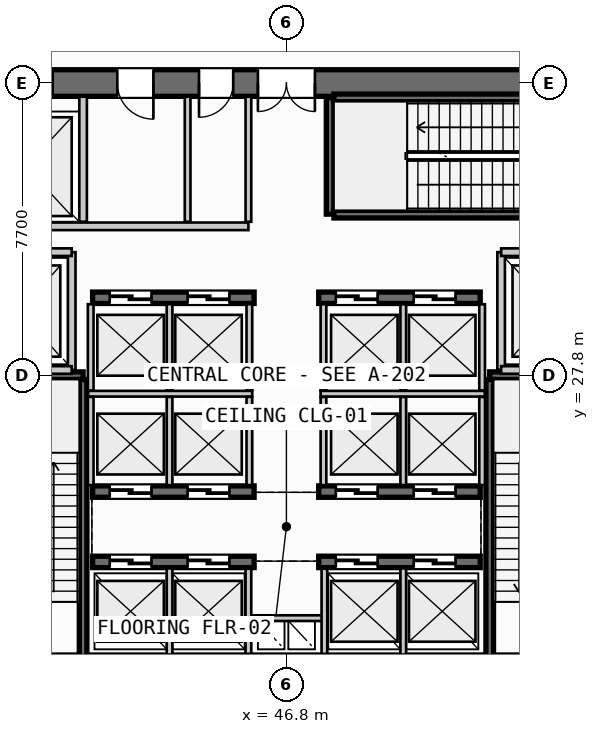
"""IFC4 building model, lengths in metres.
Left out: names, types, materials, properties, quantities, classifications, styles, units other than length and angle.
Written with IfcOpenShell. Run it as: python <this file> out.ifc"""

import sys

from ifc_helpers import new_model, si_unit, direction, frame, frame_2d, origin, place, context, subcontext, project, spatial, rectangle, extrude, source, transform, mapped, element, fill, save


model = new_model("IFC4")
c1 = context("Model", 3, precision=1e-05, world=origin(), true_north=direction((0.0, 1.0)))
c2 = subcontext(c1, "Body", "Model", "MODEL_VIEW")
j1 = project(units=[si_unit("LENGTHUNIT", "METRE"), si_unit("PLANEANGLEUNIT", "RADIAN")], contexts=[c1])
p1 = place(None, origin())
s1 = spatial("IfcSite", under=j1, at=p1, CompositionType="ELEMENT")
p2 = place(p1, origin())
s2 = spatial("IfcBuilding", under=s1, at=p2, CompositionType="ELEMENT")
p3 = place(p2, origin())
s3 = spatial("IfcBuildingStorey", under=s2, at=p3, CompositionType="ELEMENT", Elevation=0.0)
p4 = place(p3, frame((38.0, 20.1, 0.0), z_axis=(0.0, 0.0, 1.0), x_axis=(1.0, 0.0, 0.0)))
e1 = element("IfcWall", 1, at=p4, inside=s3, PredefinedType="SHEAR", context=c2, shape_type="SweptSolid", body=[
    extrude(rectangle(XDim=17.6, YDim=0.7, at=frame_2d((8.8, 0.0))), origin(), (0.0, 0.0, 1.0), 4.95),
])
p5 = place(p4, frame((1.4, 0.0, 0.0)))
e2 = element("IfcOpeningElement", 2, at=p5, cuts=e1, PredefinedType="OPENING", context=c2, shape_type="SweptSolid", body=[
    extrude(rectangle(XDim=1.05, YDim=2.15, at=frame_2d((0.525, 1.075))), frame((0.0, 0.36, 0.0), z_axis=(0.0, -1.0, 0.0), x_axis=(1.0, 0.0, 0.0)), (0.0, 0.0, 1.0), 0.72),
])
p6 = place(p4, frame((15.15, 0.0, 0.0)))
e3 = element("IfcOpeningElement", 3, at=p6, cuts=e1, PredefinedType="OPENING", context=c2, shape_type="SweptSolid", body=[
    extrude(rectangle(XDim=1.05, YDim=2.15, at=frame_2d((0.525, 1.075))), frame((0.0, 0.36, 0.0), z_axis=(0.0, -1.0, 0.0), x_axis=(1.0, 0.0, 0.0)), (0.0, 0.0, 1.0), 0.72),
])
p7 = place(p3, frame((55.6, 35.5, 0.0), z_axis=(0.0, 0.0, 1.0), x_axis=(-1.0, 0.0, 0.0)))
e4 = element("IfcWall", 4, at=p7, inside=s3, PredefinedType="SHEAR", context=c2, shape_type="SweptSolid", body=[
    extrude(rectangle(XDim=17.6, YDim=0.7, at=frame_2d((8.8, 0.0))), origin(), (0.0, 0.0, 1.0), 4.95),
])
p8 = place(p7, frame((8.05, 0.0, 0.0)))
e5 = element("IfcOpeningElement", 5, at=p8, cuts=e4, PredefinedType="OPENING", context=c2, shape_type="SweptSolid", body=[
    extrude(rectangle(XDim=1.5, YDim=2.2, at=frame_2d((0.75, 1.1))), frame((0.0, 0.36, 0.0), z_axis=(0.0, -1.0, 0.0), x_axis=(1.0, 0.0, 0.0)), (0.0, 0.0, 1.0), 0.72),
])
p9 = place(p7, frame((14.95, 0.0, 0.0)))
e6 = element("IfcOpeningElement", 6, at=p9, cuts=e4, PredefinedType="OPENING", context=c2, shape_type="SweptSolid", body=[
    extrude(rectangle(XDim=1.4, YDim=2.3, at=frame_2d((0.7, 1.15))), frame((0.0, 0.36, 0.0), z_axis=(0.0, -1.0, 0.0), x_axis=(1.0, 0.0, 0.0)), (0.0, 0.0, 1.0), 0.72),
])
p10 = place(p7, frame((12.3, 0.0, 0.0)))
e7 = element("IfcOpeningElement", 7, at=p10, cuts=e4, PredefinedType="OPENING", context=c2, shape_type="SweptSolid", body=[
    extrude(rectangle(XDim=0.95, YDim=2.15, at=frame_2d((0.475, 1.075))), frame((0.0, 0.36, 0.0), z_axis=(0.0, -1.0, 0.0), x_axis=(1.0, 0.0, 0.0)), (0.0, 0.0, 1.0), 0.72),
])
p11 = place(p7, frame((10.2, 0.0, 0.0)))
e8 = element("IfcOpeningElement", 8, at=p11, cuts=e4, PredefinedType="OPENING", context=c2, shape_type="SweptSolid", body=[
    extrude(rectangle(XDim=0.9, YDim=2.15, at=frame_2d((0.45, 1.075))), frame((0.0, 0.36, 0.0), z_axis=(0.0, -1.0, 0.0), x_axis=(1.0, 0.0, 0.0)), (0.0, 0.0, 1.0), 0.72),
])
p12 = place(p3, frame((41.7, 22.9, 0.0), z_axis=(0.0, 0.0, 1.0), x_axis=(1.0, 0.0, 0.0)))
e9 = element("IfcWall", 9, at=p12, inside=s3, PredefinedType="SHEAR", context=c2, shape_type="SweptSolid", body=[
    extrude(rectangle(XDim=4.25, YDim=0.3, at=frame_2d((2.125, 0.0))), origin(), (0.0, 0.0, 1.0), 4.95),
])
p13 = place(p12, frame((0.45, 0.0, 0.0)))
e10 = element("IfcOpeningElement", 10, at=p13, cuts=e9, PredefinedType="OPENING", context=c2, shape_type="SweptSolid", body=[
    extrude(rectangle(XDim=1.1, YDim=2.2, at=frame_2d((0.55, 1.1))), frame((0.0, 0.16, 0.0), z_axis=(0.0, -1.0, 0.0), x_axis=(1.0, 0.0, 0.0)), (0.0, 0.0, 1.0), 0.32),
])
p14 = place(p12, frame((2.5, 0.0, 0.0)))
e11 = element("IfcOpeningElement", 11, at=p14, cuts=e9, PredefinedType="OPENING", context=c2, shape_type="SweptSolid", body=[
    extrude(rectangle(XDim=1.1, YDim=2.2, at=frame_2d((0.55, 1.1))), frame((0.0, 0.16, 0.0), z_axis=(0.0, -1.0, 0.0), x_axis=(1.0, 0.0, 0.0)), (0.0, 0.0, 1.0), 0.32),
])
p15 = place(p3, frame((47.65, 22.9, 0.0), z_axis=(0.0, 0.0, 1.0), x_axis=(1.0, 0.0, 0.0)))
e12 = element("IfcWall", 12, at=p15, inside=s3, PredefinedType="SHEAR", context=c2, shape_type="SweptSolid", body=[
    extrude(rectangle(XDim=4.25, YDim=0.3, at=frame_2d((2.125, 0.0))), origin(), (0.0, 0.0, 1.0), 4.95),
])
p16 = place(p15, frame((0.45, 0.0, 0.0)))
e13 = element("IfcOpeningElement", 13, at=p16, cuts=e12, PredefinedType="OPENING", context=c2, shape_type="SweptSolid", body=[
    extrude(rectangle(XDim=1.1, YDim=2.2, at=frame_2d((0.55, 1.1))), frame((0.0, 0.16, 0.0), z_axis=(0.0, -1.0, 0.0), x_axis=(1.0, 0.0, 0.0)), (0.0, 0.0, 1.0), 0.32),
])
p17 = place(p15, frame((2.5, 0.0, 0.0)))
e14 = element("IfcOpeningElement", 14, at=p17, cuts=e12, PredefinedType="OPENING", context=c2, shape_type="SweptSolid", body=[
    extrude(rectangle(XDim=1.1, YDim=2.2, at=frame_2d((0.55, 1.1))), frame((0.0, 0.16, 0.0), z_axis=(0.0, -1.0, 0.0), x_axis=(1.0, 0.0, 0.0)), (0.0, 0.0, 1.0), 0.32),
])
p18 = place(p3, frame((41.7, 24.75, 0.0), z_axis=(0.0, 0.0, 1.0), x_axis=(1.0, 0.0, 0.0)))
e15 = element("IfcWall", 15, at=p18, inside=s3, PredefinedType="SHEAR", context=c2, shape_type="SweptSolid", body=[
    extrude(rectangle(XDim=4.25, YDim=0.3, at=frame_2d((2.125, 0.0))), origin(), (0.0, 0.0, 1.0), 4.95),
])
p19 = place(p18, frame((0.45, 0.0, 0.0)))
e16 = element("IfcOpeningElement", 16, at=p19, cuts=e15, PredefinedType="OPENING", context=c2, shape_type="SweptSolid", body=[
    extrude(rectangle(XDim=1.1, YDim=2.2, at=frame_2d((0.55, 1.1))), frame((0.0, 0.16, 0.0), z_axis=(0.0, -1.0, 0.0), x_axis=(1.0, 0.0, 0.0)), (0.0, 0.0, 1.0), 0.32),
])
p20 = place(p18, frame((2.5, 0.0, 0.0)))
e17 = element("IfcOpeningElement", 17, at=p20, cuts=e15, PredefinedType="OPENING", context=c2, shape_type="SweptSolid", body=[
    extrude(rectangle(XDim=1.1, YDim=2.2, at=frame_2d((0.55, 1.1))), frame((0.0, 0.16, 0.0), z_axis=(0.0, -1.0, 0.0), x_axis=(1.0, 0.0, 0.0)), (0.0, 0.0, 1.0), 0.32),
])
p21 = place(p3, frame((47.65, 24.75, 0.0), z_axis=(0.0, 0.0, 1.0), x_axis=(1.0, 0.0, 0.0)))
e18 = element("IfcWall", 18, at=p21, inside=s3, PredefinedType="SHEAR", context=c2, shape_type="SweptSolid", body=[
    extrude(rectangle(XDim=4.25, YDim=0.3, at=frame_2d((2.125, 0.0))), origin(), (0.0, 0.0, 1.0), 4.95),
])
p22 = place(p21, frame((0.45, 0.0, 0.0)))
e19 = element("IfcOpeningElement", 19, at=p22, cuts=e18, PredefinedType="OPENING", context=c2, shape_type="SweptSolid", body=[
    extrude(rectangle(XDim=1.1, YDim=2.2, at=frame_2d((0.55, 1.1))), frame((0.0, 0.16, 0.0), z_axis=(0.0, -1.0, 0.0), x_axis=(1.0, 0.0, 0.0)), (0.0, 0.0, 1.0), 0.32),
])
p23 = place(p21, frame((2.5, 0.0, 0.0)))
e20 = element("IfcOpeningElement", 20, at=p23, cuts=e18, PredefinedType="OPENING", context=c2, shape_type="SweptSolid", body=[
    extrude(rectangle(XDim=1.1, YDim=2.2, at=frame_2d((0.55, 1.1))), frame((0.0, 0.16, 0.0), z_axis=(0.0, -1.0, 0.0), x_axis=(1.0, 0.0, 0.0)), (0.0, 0.0, 1.0), 0.32),
])
p24 = place(p3, frame((41.7, 29.85, 0.0), z_axis=(0.0, 0.0, 1.0), x_axis=(1.0, 0.0, 0.0)))
e21 = element("IfcWall", 21, at=p24, inside=s3, PredefinedType="SHEAR", context=c2, shape_type="SweptSolid", body=[
    extrude(rectangle(XDim=4.25, YDim=0.3, at=frame_2d((2.125, 0.0))), origin(), (0.0, 0.0, 1.0), 4.95),
])
p25 = place(p24, frame((0.45, 0.0, 0.0)))
e22 = element("IfcOpeningElement", 22, at=p25, cuts=e21, PredefinedType="OPENING", context=c2, shape_type="SweptSolid", body=[
    extrude(rectangle(XDim=1.1, YDim=2.2, at=frame_2d((0.55, 1.1))), frame((0.0, 0.16, 0.0), z_axis=(0.0, -1.0, 0.0), x_axis=(1.0, 0.0, 0.0)), (0.0, 0.0, 1.0), 0.32),
])
p26 = place(p24, frame((2.5, 0.0, 0.0)))
e23 = element("IfcOpeningElement", 23, at=p26, cuts=e21, PredefinedType="OPENING", context=c2, shape_type="SweptSolid", body=[
    extrude(rectangle(XDim=1.1, YDim=2.2, at=frame_2d((0.55, 1.1))), frame((0.0, 0.16, 0.0), z_axis=(0.0, -1.0, 0.0), x_axis=(1.0, 0.0, 0.0)), (0.0, 0.0, 1.0), 0.32),
])
p27 = place(p3, frame((47.65, 29.85, 0.0), z_axis=(0.0, 0.0, 1.0), x_axis=(1.0, 0.0, 0.0)))
e24 = element("IfcWall", 24, at=p27, inside=s3, PredefinedType="SHEAR", context=c2, shape_type="SweptSolid", body=[
    extrude(rectangle(XDim=4.25, YDim=0.3, at=frame_2d((2.125, 0.0))), origin(), (0.0, 0.0, 1.0), 4.95),
])
p28 = place(p27, frame((0.45, 0.0, 0.0)))
e25 = element("IfcOpeningElement", 25, at=p28, cuts=e24, PredefinedType="OPENING", context=c2, shape_type="SweptSolid", body=[
    extrude(rectangle(XDim=1.1, YDim=2.2, at=frame_2d((0.55, 1.1))), frame((0.0, 0.16, 0.0), z_axis=(0.0, -1.0, 0.0), x_axis=(1.0, 0.0, 0.0)), (0.0, 0.0, 1.0), 0.32),
])
p29 = place(p27, frame((2.5, 0.0, 0.0)))
e26 = element("IfcOpeningElement", 26, at=p29, cuts=e24, PredefinedType="OPENING", context=c2, shape_type="SweptSolid", body=[
    extrude(rectangle(XDim=1.1, YDim=2.2, at=frame_2d((0.55, 1.1))), frame((0.0, 0.16, 0.0), z_axis=(0.0, -1.0, 0.0), x_axis=(1.0, 0.0, 0.0)), (0.0, 0.0, 1.0), 0.32),
])
p30 = place(p3, frame((38.39, 27.8, 0.0), z_axis=(0.0, 0.0, 1.0), x_axis=(1.0, 0.0, 0.0)))
e27 = element("IfcWall", 27, at=p30, inside=s3, PredefinedType="SHEAR", context=c2, shape_type="SweptSolid", body=[
    extrude(rectangle(XDim=3.06, YDim=0.2, at=frame_2d((1.53, 0.0))), origin(), (0.0, 0.0, 1.0), 4.95),
])
p31 = place(p3, frame((41.45, 27.7, 0.0), z_axis=(0.0, 0.0, 1.0), x_axis=(0.0, -1.0, 0.0)))
e28 = element("IfcWall", 28, at=p31, inside=s3, PredefinedType="SHEAR", context=c2, shape_type="SweptSolid", body=[
    extrude(rectangle(XDim=7.35, YDim=0.2, at=frame_2d((3.675, 0.0))), origin(), (0.0, 0.0, 1.0), 4.95),
])
p32 = place(p3, frame((52.15, 27.8, 0.0), z_axis=(0.0, 0.0, 1.0), x_axis=(1.0, 0.0, 0.0)))
e29 = element("IfcWall", 29, at=p32, inside=s3, PredefinedType="SHEAR", context=c2, shape_type="SweptSolid", body=[
    extrude(rectangle(XDim=3.06, YDim=0.2, at=frame_2d((1.53, 0.0))), origin(), (0.0, 0.0, 1.0), 4.95),
])
p33 = place(p3, frame((52.15, 20.35, 0.0), z_axis=(0.0, 0.0, 1.0), x_axis=(0.0, 1.0, 0.0)))
e30 = element("IfcWall", 30, at=p33, inside=s3, PredefinedType="SHEAR", context=c2, shape_type="SweptSolid", body=[
    extrude(rectangle(XDim=7.35, YDim=0.2, at=frame_2d((3.675, 0.0))), origin(), (0.0, 0.0, 1.0), 4.95),
])
p34 = place(p3, frame((47.95, 32.05, 0.0), z_axis=(0.0, 0.0, 1.0), x_axis=(0.0, 1.0, 0.0)))
e31 = element("IfcWall", 31, at=p34, inside=s3, PredefinedType="SHEAR", context=c2, shape_type="SweptSolid", body=[
    extrude(rectangle(XDim=3.06, YDim=0.2, at=frame_2d((1.53, 0.0))), origin(), (0.0, 0.0, 1.0), 4.95),
])
for number, where, z_axis, x_axis in (
    (32, (48.05, 35.11, 0.0), (0.0, 0.0, 1.0), (1.0, 0.0, 0.0)),
    (33, (55.4, 32.05, 0.0), (0.0, 0.0, 1.0), (-1.0, 0.0, 0.0)),
):
    element("IfcWall", number, at=place(p3, frame(where, z_axis=z_axis, x_axis=x_axis)), inside=s3, PredefinedType="SHEAR", context=c2, shape_type="SweptSolid", body=[
        extrude(rectangle(XDim=7.35, YDim=0.2, at=frame_2d((3.675, 0.0))), origin(), (0.0, 0.0, 1.0), 4.95),
    ])
p35 = place(p3, frame((45.8, 21.42, 0.0), z_axis=(0.0, 0.0, 1.0), x_axis=(1.0, 0.0, 0.0)))
e34 = element("IfcWall", 34, at=p35, inside=s3, PredefinedType="PARTITIONING", context=c2, shape_type="SweptSolid", body=[
    extrude(rectangle(XDim=2.0, YDim=0.15, at=frame_2d((1.0, 0.0))), origin(), (0.0, 0.0, 1.0), 4.163),
])
for number, where, z_axis, x_axis in (
    (35, (45.8, 20.48, 0.0), (0.0, 0.0, 1.0), (0.0, 1.0, 0.0)),
    (36, (47.8, 20.48, 0.0), (0.0, 0.0, 1.0), (0.0, 1.0, 0.0)),
):
    element("IfcWall", number, at=place(p3, frame(where, z_axis=z_axis, x_axis=x_axis)), inside=s3, PredefinedType="PARTITIONING", context=c2, shape_type="SweptSolid", body=[
        extrude(rectangle(XDim=2.24, YDim=0.15, at=frame_2d((1.12, 0.0))), origin(), (0.0, 0.0, 1.0), 4.163),
    ])
p36 = place(p3, frame((41.15, 27.95, 0.0), z_axis=(0.0, 0.0, 1.0), x_axis=(0.0, 1.0, 0.0)))
e37 = element("IfcWall", 37, at=p36, inside=s3, PredefinedType="PARTITIONING", context=c2, shape_type="SweptSolid", body=[
    extrude(rectangle(XDim=3.1, YDim=0.2, at=frame_2d((1.55, 0.0))), origin(), (0.0, 0.0, 1.0), 4.163),
])
for number, where, z_axis, x_axis in (
    (38, (38.36, 27.95, 0.0), (0.0, 0.0, 1.0), (1.0, 0.0, 0.0)),
    (39, (38.36, 31.05, 0.0), (0.0, 0.0, 1.0), (1.0, 0.0, 0.0)),
):
    element("IfcWall", number, at=place(p3, frame(where, z_axis=z_axis, x_axis=x_axis)), inside=s3, PredefinedType="PARTITIONING", context=c2, shape_type="SweptSolid", body=[
        extrude(rectangle(XDim=2.79, YDim=0.2, at=frame_2d((1.395, 0.0))), origin(), (0.0, 0.0, 1.0), 4.163),
    ])
p37 = place(p3, frame((52.45, 27.95, 0.0), z_axis=(0.0, 0.0, 1.0), x_axis=(0.0, 1.0, 0.0)))
e40 = element("IfcWall", 40, at=p37, inside=s3, PredefinedType="PARTITIONING", context=c2, shape_type="SweptSolid", body=[
    extrude(rectangle(XDim=3.1, YDim=0.2, at=frame_2d((1.55, 0.0))), origin(), (0.0, 0.0, 1.0), 4.163),
])
for number, where, z_axis, x_axis in (
    (41, (52.45, 27.95, 0.0), (0.0, 0.0, 1.0), (1.0, 0.0, 0.0)),
    (42, (52.45, 31.05, 0.0), (0.0, 0.0, 1.0), (1.0, 0.0, 0.0)),
):
    element("IfcWall", number, at=place(p3, frame(where, z_axis=z_axis, x_axis=x_axis)), inside=s3, PredefinedType="PARTITIONING", context=c2, shape_type="SweptSolid", body=[
        extrude(rectangle(XDim=2.79, YDim=0.2, at=frame_2d((1.395, 0.0))), origin(), (0.0, 0.0, 1.0), 4.163),
    ])
for number, where, z_axis, x_axis in (
    (43, (43.725, 20.46, 0.0), (0.0, 0.0, 1.0), (0.0, 1.0, 0.0)),
    (44, (49.875, 20.46, 0.0), (0.0, 0.0, 1.0), (0.0, 1.0, 0.0)),
):
    element("IfcWall", number, at=place(p3, frame(where, z_axis=z_axis, x_axis=x_axis)), inside=s3, PredefinedType="PARTITIONING", context=c2, shape_type="SweptSolid", body=[
        extrude(rectangle(XDim=2.27, YDim=0.15, at=frame_2d((1.135, 0.0))), origin(), (0.0, 0.0, 1.0), 4.163),
    ])
p38 = place(p3, frame((41.58, 27.325, 0.0), z_axis=(0.0, 0.0, 1.0), x_axis=(1.0, 0.0, 0.0)))
e45 = element("IfcWall", 45, at=p38, inside=s3, PredefinedType="PARTITIONING", context=c2, shape_type="SweptSolid", body=[
    extrude(rectangle(XDim=4.32, YDim=0.15, at=frame_2d((2.16, 0.0))), origin(), (0.0, 0.0, 1.0), 4.163),
])
p39 = place(p3, frame((47.7, 27.325, 0.0), z_axis=(0.0, 0.0, 1.0), x_axis=(1.0, 0.0, 0.0)))
e46 = element("IfcWall", 46, at=p39, inside=s3, PredefinedType="PARTITIONING", context=c2, shape_type="SweptSolid", body=[
    extrude(rectangle(XDim=4.32, YDim=0.15, at=frame_2d((2.16, 0.0))), origin(), (0.0, 0.0, 1.0), 4.163),
])
for number, where, z_axis, x_axis in (
    (47, (41.65, 24.92, 0.0), (0.0, 0.0, 1.0), (0.0, 1.0, 0.0)),
    (48, (43.725, 24.92, 0.0), (0.0, 0.0, 1.0), (0.0, 1.0, 0.0)),
    (49, (45.825, 24.92, 0.0), (0.0, 0.0, 1.0), (0.0, 1.0, 0.0)),
    (50, (47.775, 24.92, 0.0), (0.0, 0.0, 1.0), (0.0, 1.0, 0.0)),
    (51, (49.875, 24.92, 0.0), (0.0, 0.0, 1.0), (0.0, 1.0, 0.0)),
    (52, (51.95, 24.92, 0.0), (0.0, 0.0, 1.0), (0.0, 1.0, 0.0)),
):
    element("IfcWall", number, at=place(p3, frame(where, z_axis=z_axis, x_axis=x_axis)), inside=s3, PredefinedType="PARTITIONING", context=c2, shape_type="SweptSolid", body=[
        extrude(rectangle(XDim=2.32, YDim=0.15, at=frame_2d((1.16, 0.0))), origin(), (0.0, 0.0, 1.0), 4.163),
    ])
for number, where, z_axis, x_axis in (
    (53, (41.65, 27.41, 0.0), (0.0, 0.0, 1.0), (0.0, 1.0, 0.0)),
    (54, (43.725, 27.41, 0.0), (0.0, 0.0, 1.0), (0.0, 1.0, 0.0)),
    (55, (45.825, 27.41, 0.0), (0.0, 0.0, 1.0), (0.0, 1.0, 0.0)),
    (56, (47.775, 27.41, 0.0), (0.0, 0.0, 1.0), (0.0, 1.0, 0.0)),
    (57, (49.875, 27.41, 0.0), (0.0, 0.0, 1.0), (0.0, 1.0, 0.0)),
    (58, (51.95, 27.41, 0.0), (0.0, 0.0, 1.0), (0.0, 1.0, 0.0)),
):
    element("IfcWall", number, at=place(p3, frame(where, z_axis=z_axis, x_axis=x_axis)), inside=s3, PredefinedType="PARTITIONING", context=c2, shape_type="SweptSolid", body=[
        extrude(rectangle(XDim=2.27, YDim=0.15, at=frame_2d((1.135, 0.0))), origin(), (0.0, 0.0, 1.0), 4.163),
    ])
p40 = place(p3, frame((41.45, 31.85, 0.0), z_axis=(0.0, 0.0, 1.0), x_axis=(0.0, 1.0, 0.0)))
e59 = element("IfcWall", 59, at=p40, inside=s3, PredefinedType="PARTITIONING", context=c2, shape_type="SweptSolid", body=[
    extrude(rectangle(XDim=3.29, YDim=0.2, at=frame_2d((1.645, 0.0))), origin(), (0.0, 0.0, 1.0), 4.163),
])
p41 = place(p3, frame((38.36, 31.73, 0.0), z_axis=(0.0, 0.0, 1.0), x_axis=(1.0, 0.0, 0.0)))
e60 = element("IfcWall", 60, at=p41, inside=s3, PredefinedType="PARTITIONING", context=c2, shape_type="SweptSolid", body=[
    extrude(rectangle(XDim=7.44, YDim=0.2, at=frame_2d((3.72, 0.0))), origin(), (0.0, 0.0, 1.0), 4.163),
])
p42 = place(p3, frame((45.8, 31.85, 0.0), z_axis=(0.0, 0.0, 1.0), x_axis=(0.0, 1.0, 0.0)))
e61 = element("IfcWall", 61, at=p42, inside=s3, PredefinedType="PARTITIONING", context=c2, shape_type="SweptSolid", body=[
    extrude(rectangle(XDim=3.29, YDim=0.15, at=frame_2d((1.645, 0.0))), origin(), (0.0, 0.0, 1.0), 4.163),
])
p43 = place(p3, frame((44.2, 31.85, 0.0), z_axis=(0.0, 0.0, 1.0), x_axis=(0.0, 1.0, 0.0)))
e62 = element("IfcWall", 62, at=p43, inside=s3, PredefinedType="PLUMBINGWALL", context=c2, shape_type="SweptSolid", body=[
    extrude(rectangle(XDim=3.29, YDim=0.15, at=frame_2d((1.645, 0.0))), origin(), (0.0, 0.0, 1.0), 4.163),
])
m1 = source(origin(), c2, "Body", "SweptSolid", [
    extrude(rectangle(XDim=1.5, YDim=2.2, at=frame_2d((0.75, 1.1))), frame((0.0, 0.025, 0.0), z_axis=(0.0, -1.0, 0.0), x_axis=(1.0, 0.0, 0.0)), (0.0, 0.0, 1.0), 0.05),
])
p44 = place(p8, origin())
e63 = element("IfcDoor", 63, at=p44, inside=s3, OperationType="DOUBLE_DOOR_SINGLE_SWING", PredefinedType="DOOR", context=c2, shape_type="MappedRepresentation", body=[
    mapped(m1, transform((0.0, 0.0, 0.0), scale=1.0)),
])
fill(e5, e63)
m2 = source(origin(), c2, "Body", "SweptSolid", [
    extrude(rectangle(XDim=1.1, YDim=2.2, at=frame_2d((0.55, 1.1))), frame((0.0, 0.025, 0.0), z_axis=(0.0, -1.0, 0.0), x_axis=(1.0, 0.0, 0.0)), (0.0, 0.0, 1.0), 0.05),
])
p45 = place(p13, origin())
e64 = element("IfcDoor", 64, at=p45, inside=s3, OperationType="SLIDING_TO_LEFT", PredefinedType="DOOR", context=c2, shape_type="MappedRepresentation", body=[
    mapped(m2, transform((0.0, 0.0, 0.0), scale=1.0)),
])
fill(e10, e64)
p46 = place(p14, origin())
e65 = element("IfcDoor", 65, at=p46, inside=s3, OperationType="SLIDING_TO_LEFT", PredefinedType="DOOR", context=c2, shape_type="MappedRepresentation", body=[
    mapped(m2, transform((0.0, 0.0, 0.0), scale=1.0)),
])
fill(e11, e65)
p47 = place(p16, origin())
e66 = element("IfcDoor", 66, at=p47, inside=s3, OperationType="SLIDING_TO_LEFT", PredefinedType="DOOR", context=c2, shape_type="MappedRepresentation", body=[
    mapped(m2, transform((0.0, 0.0, 0.0), scale=1.0)),
])
fill(e13, e66)
p48 = place(p17, origin())
e67 = element("IfcDoor", 67, at=p48, inside=s3, OperationType="SLIDING_TO_LEFT", PredefinedType="DOOR", context=c2, shape_type="MappedRepresentation", body=[
    mapped(m2, transform((0.0, 0.0, 0.0), scale=1.0)),
])
fill(e14, e67)
p49 = place(p19, origin())
e68 = element("IfcDoor", 68, at=p49, inside=s3, OperationType="SLIDING_TO_RIGHT", PredefinedType="DOOR", context=c2, shape_type="MappedRepresentation", body=[
    mapped(m2, transform((0.0, 0.0, 0.0), scale=1.0)),
])
fill(e16, e68)
p50 = place(p20, origin())
e69 = element("IfcDoor", 69, at=p50, inside=s3, OperationType="SLIDING_TO_RIGHT", PredefinedType="DOOR", context=c2, shape_type="MappedRepresentation", body=[
    mapped(m2, transform((0.0, 0.0, 0.0), scale=1.0)),
])
fill(e17, e69)
p51 = place(p22, origin())
e70 = element("IfcDoor", 70, at=p51, inside=s3, OperationType="SLIDING_TO_RIGHT", PredefinedType="DOOR", context=c2, shape_type="MappedRepresentation", body=[
    mapped(m2, transform((0.0, 0.0, 0.0), scale=1.0)),
])
fill(e19, e70)
p52 = place(p23, origin())
e71 = element("IfcDoor", 71, at=p52, inside=s3, OperationType="SLIDING_TO_RIGHT", PredefinedType="DOOR", context=c2, shape_type="MappedRepresentation", body=[
    mapped(m2, transform((0.0, 0.0, 0.0), scale=1.0)),
])
fill(e20, e71)
p53 = place(p25, origin())
e72 = element("IfcDoor", 72, at=p53, inside=s3, OperationType="SLIDING_TO_LEFT", PredefinedType="DOOR", context=c2, shape_type="MappedRepresentation", body=[
    mapped(m2, transform((0.0, 0.0, 0.0), scale=1.0)),
])
fill(e22, e72)
p54 = place(p26, origin())
e73 = element("IfcDoor", 73, at=p54, inside=s3, OperationType="SLIDING_TO_LEFT", PredefinedType="DOOR", context=c2, shape_type="MappedRepresentation", body=[
    mapped(m2, transform((0.0, 0.0, 0.0), scale=1.0)),
])
fill(e23, e73)
p55 = place(p28, origin())
e74 = element("IfcDoor", 74, at=p55, inside=s3, OperationType="SLIDING_TO_LEFT", PredefinedType="DOOR", context=c2, shape_type="MappedRepresentation", body=[
    mapped(m2, transform((0.0, 0.0, 0.0), scale=1.0)),
])
fill(e25, e74)
p56 = place(p29, origin())
e75 = element("IfcDoor", 75, at=p56, inside=s3, OperationType="SLIDING_TO_LEFT", PredefinedType="DOOR", context=c2, shape_type="MappedRepresentation", body=[
    mapped(m2, transform((0.0, 0.0, 0.0), scale=1.0)),
])
fill(e26, e75)
m3 = source(origin(), c2, "Body", "SweptSolid", [
    extrude(rectangle(XDim=1.4, YDim=2.3, at=frame_2d((0.7, 1.15))), frame((0.0, 0.025, 0.0), z_axis=(0.0, -1.0, 0.0), x_axis=(1.0, 0.0, 0.0)), (0.0, 0.0, 1.0), 0.05),
])
p57 = place(p9, origin())
e76 = element("IfcDoor", 76, at=p57, inside=s3, OperationType="SLIDING_TO_RIGHT", PredefinedType="DOOR", context=c2, shape_type="MappedRepresentation", body=[
    mapped(m3, transform((0.0, 0.0, 0.0), scale=1.0)),
])
fill(e6, e76)
m4 = source(origin(), c2, "Body", "SweptSolid", [
    extrude(rectangle(XDim=0.95, YDim=2.15, at=frame_2d((0.475, 1.075))), frame((0.0, 0.025, 0.0), z_axis=(0.0, -1.0, 0.0), x_axis=(1.0, 0.0, 0.0)), (0.0, 0.0, 1.0), 0.05),
])
p58 = place(p10, origin())
e77 = element("IfcDoor", 77, at=p58, inside=s3, OperationType="SINGLE_SWING_LEFT", PredefinedType="DOOR", context=c2, shape_type="MappedRepresentation", body=[
    mapped(m4, transform((0.0, 0.0, 0.0), scale=1.0)),
])
fill(e7, e77)
m5 = source(origin(), c2, "Body", "SweptSolid", [
    extrude(rectangle(XDim=0.9, YDim=2.15, at=frame_2d((0.45, 1.075))), frame((0.0, 0.025, 0.0), z_axis=(0.0, -1.0, 0.0), x_axis=(1.0, 0.0, 0.0)), (0.0, 0.0, 1.0), 0.05),
])
p59 = place(p11, origin())
e78 = element("IfcDoor", 78, at=p59, inside=s3, OperationType="SINGLE_SWING_RIGHT", PredefinedType="DOOR", context=c2, shape_type="MappedRepresentation", body=[
    mapped(m5, transform((0.0, 0.0, 0.0), scale=1.0)),
])
fill(e8, e78)
save(model, sys.argv[1])
